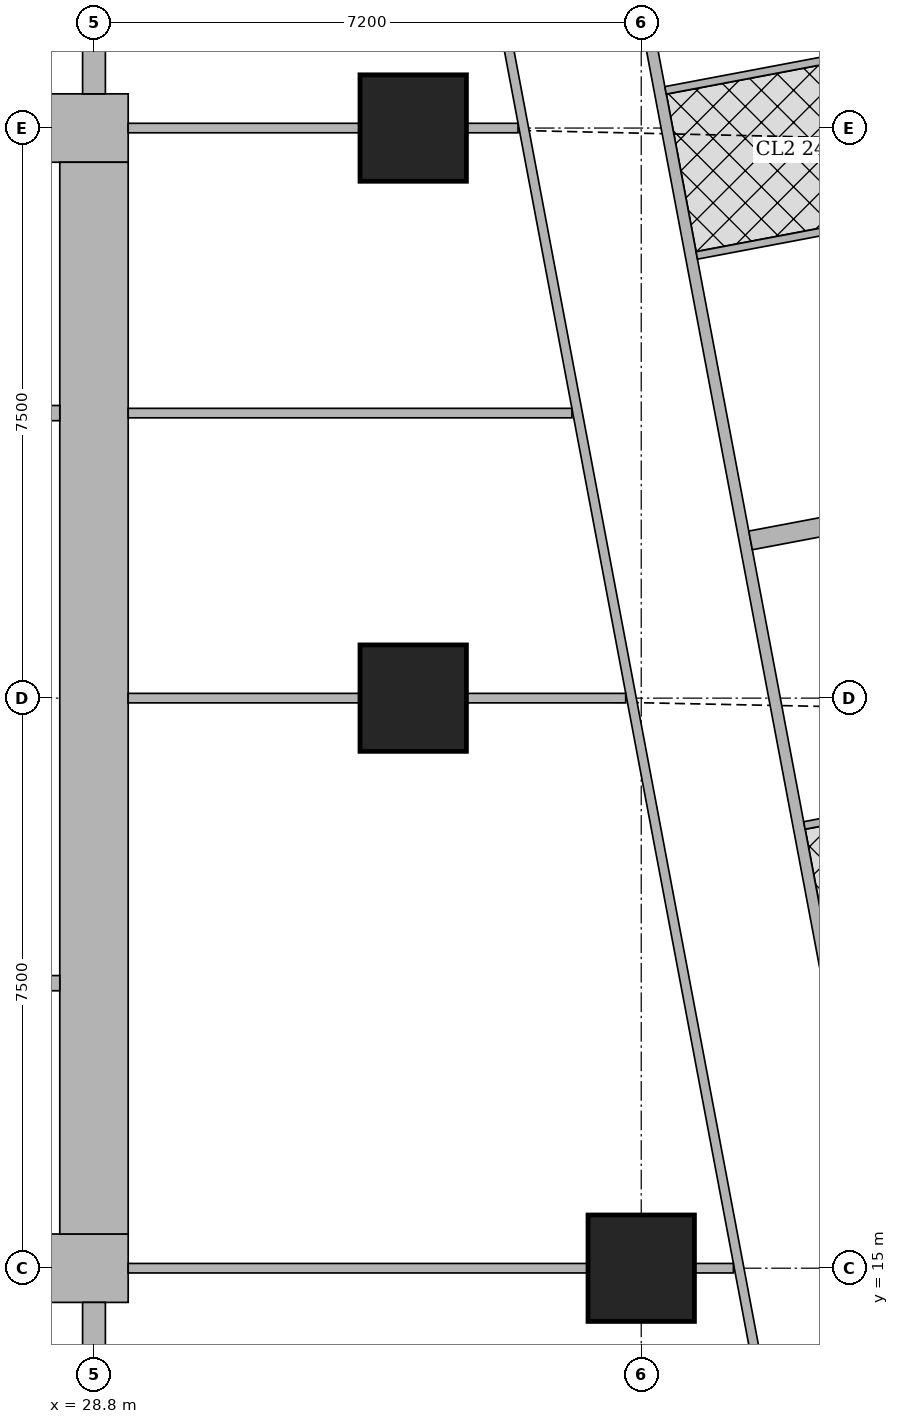
"""IFC4 building model, lengths in metres.
Left out: names, types, materials, properties, quantities, classifications, styles, units other than length and angle.
Written with IfcOpenShell. Run it as: python <this file> out.ifc"""

import sys

from ifc_helpers import new_model, si_unit, direction, frame, frame_2d, origin, origin_2d, place, context, subcontext, project, spatial, rectangle, extrude, element, fill, save


model = new_model("IFC4")
c1 = context("Model", 3, precision=1e-05, world=origin(), true_north=direction((0.0, 1.0)))
c2 = subcontext(c1, "Body", "Model", "MODEL_VIEW")
j1 = project(units=[si_unit("LENGTHUNIT", "METRE"), si_unit("PLANEANGLEUNIT", "RADIAN")], contexts=[c1])
p1 = place(None, origin())
s1 = spatial("IfcSite", under=j1, at=p1, CompositionType="ELEMENT")
p2 = place(p1, origin())
s2 = spatial("IfcBuilding", under=s1, at=p2, CompositionType="ELEMENT")
p3 = place(p2, frame((0.0, 0.0, 262.85)))
s3 = spatial("IfcBuildingStorey", under=s2, at=p3, CompositionType="ELEMENT", Elevation=262.85)
for number, where, z_axis, x_axis in (
    (1, (36.0, 15.0, 0.0), (0.0, 0.0, 1.0), (1.0, 0.0, 0.0)),
    (2, (33.0, 22.5, 0.0), (0.0, 0.0, 1.0), (1.0, 0.0, 0.0)),
    (3, (33.0, 30.0, 0.0), (0.0, 0.0, 1.0), (1.0, 0.0, 0.0)),
):
    element("IfcColumn", number, at=place(p3, frame(where, z_axis=z_axis, x_axis=x_axis)), inside=s3, PredefinedType="COLUMN", context=c2, shape_type="SweptSolid", body=[
        extrude(rectangle(XDim=1.4, YDim=1.4, at=origin_2d()), origin(), (0.0, 0.0, 1.0), 3.75),
    ])
p4 = place(p3, frame((13.95, 15.0, 0.0), z_axis=(0.0, 0.0, 1.0), x_axis=(1.0, 0.0, 0.0)))
e4 = element("IfcWall", 4, at=p4, inside=s3, PredefinedType="SHEAR", context=c2, shape_type="SweptSolid", body=[
    extrude(rectangle(XDim=15.3, YDim=0.9, at=frame_2d((7.65, 0.0))), origin(), (0.0, 0.0, 1.0), 3.75),
])
p5 = place(p4, frame((4.45, 0.0, 0.0)))
e5 = element("IfcOpeningElement", 5, at=p5, cuts=e4, PredefinedType="OPENING", context=c2, shape_type="SweptSolid", body=[
    extrude(rectangle(XDim=1.8, YDim=2.1, at=frame_2d((0.9, 1.05))), frame((0.0, 0.46, 0.0), z_axis=(0.0, -1.0, 0.0), x_axis=(1.0, 0.0, 0.0)), (0.0, 0.0, 1.0), 0.92),
])
p6 = place(p4, frame((10.7, 0.0, 0.0)))
e6 = element("IfcOpeningElement", 6, at=p6, cuts=e4, PredefinedType="OPENING", context=c2, shape_type="SweptSolid", body=[
    extrude(rectangle(XDim=1.1, YDim=2.1, at=frame_2d((0.55, 1.05))), frame((0.0, 0.46, 0.0), z_axis=(0.0, -1.0, 0.0), x_axis=(1.0, 0.0, 0.0)), (0.0, 0.0, 1.0), 0.92),
])
p7 = place(p3, frame((13.95, 30.0, 0.0), z_axis=(0.0, 0.0, 1.0), x_axis=(1.0, 0.0, 0.0)))
e7 = element("IfcWall", 7, at=p7, inside=s3, PredefinedType="SHEAR", context=c2, shape_type="SweptSolid", body=[
    extrude(rectangle(XDim=15.3, YDim=0.9, at=frame_2d((7.65, 0.0))), origin(), (0.0, 0.0, 1.0), 3.75),
])
p8 = place(p7, frame((4.45, 0.0, 0.0)))
e8 = element("IfcOpeningElement", 8, at=p8, cuts=e7, PredefinedType="OPENING", context=c2, shape_type="SweptSolid", body=[
    extrude(rectangle(XDim=1.8, YDim=2.1, at=frame_2d((0.9, 1.05))), frame((0.0, 0.46, 0.0), z_axis=(0.0, -1.0, 0.0), x_axis=(1.0, 0.0, 0.0)), (0.0, 0.0, 1.0), 0.92),
])
p9 = place(p7, frame((10.7, 0.0, 0.0)))
e9 = element("IfcOpeningElement", 9, at=p9, cuts=e7, PredefinedType="OPENING", context=c2, shape_type="SweptSolid", body=[
    extrude(rectangle(XDim=1.1, YDim=2.1, at=frame_2d((0.55, 1.05))), frame((0.0, 0.46, 0.0), z_axis=(0.0, -1.0, 0.0), x_axis=(1.0, 0.0, 0.0)), (0.0, 0.0, 1.0), 0.92),
])
p10 = place(p3, frame((28.8, 15.45, 0.0), z_axis=(0.0, 0.0, 1.0), x_axis=(0.0, 1.0, 0.0)))
e10 = element("IfcWall", 10, at=p10, inside=s3, PredefinedType="SHEAR", context=c2, shape_type="SweptSolid", body=[
    extrude(rectangle(XDim=14.1, YDim=0.9, at=frame_2d((7.05, 0.0))), origin(), (0.0, 0.0, 1.0), 3.75),
])
for number, where, z_axis, x_axis in (
    (11, (28.8, 10.35, 0.0), (0.0, 0.0, 1.0), (0.0, 1.0, 0.0)),
    (12, (28.8, 30.45, 0.0), (0.0, 0.0, 1.0), (0.0, 1.0, 0.0)),
):
    element("IfcWall", number, at=place(p3, frame(where, z_axis=z_axis, x_axis=x_axis)), inside=s3, PredefinedType="SHEAR", context=c2, shape_type="SweptSolid", body=[
        extrude(rectangle(XDim=4.2, YDim=0.3, at=frame_2d((2.1, 0.0))), origin(), (0.0, 0.0, 1.0), 3.75),
    ])
p11 = place(p3, frame((34.036, 42.186, 0.0), z_axis=(0.0, 0.0, 1.0), x_axis=(0.185593518645, -0.9826266055, 0.0)))
e13 = element("IfcWall", 13, at=p11, inside=s3, PredefinedType="SOLIDWALL", context=c2, shape_type="SweptSolid", body=[
    extrude(rectangle(XDim=35.961, YDim=0.15, at=frame_2d((17.98, 0.0))), origin(), (0.0, 0.0, 1.0), 2.5),
])
p12 = place(p11, frame((15.529, 0.0, 0.0)))
e14 = element("IfcOpeningElement", 14, at=p12, cuts=e13, PredefinedType="OPENING", context=c2, shape_type="SweptSolid", body=[
    extrude(rectangle(XDim=1.0, YDim=2.1, at=frame_2d((0.5, 1.05))), frame((0.0, 0.085, 0.0), z_axis=(0.0, -1.0, 0.0), x_axis=(1.0, 0.0, 0.0)), (0.0, 0.0, 1.0), 0.17),
])
p13 = place(p11, frame((19.345, 0.0, 0.0)))
e15 = element("IfcOpeningElement", 15, at=p13, cuts=e13, PredefinedType="OPENING", context=c2, shape_type="SweptSolid", body=[
    extrude(rectangle(XDim=1.0, YDim=2.1, at=frame_2d((0.5, 1.05))), frame((0.0, 0.085, 0.0), z_axis=(0.0, -1.0, 0.0), x_axis=(1.0, 0.0, 0.0)), (0.0, 0.0, 1.0), 0.17),
])
p14 = place(p11, frame((30.594, 0.0, 0.0)))
e16 = element("IfcOpeningElement", 16, at=p14, cuts=e13, PredefinedType="OPENING", context=c2, shape_type="SweptSolid", body=[
    extrude(rectangle(XDim=1.0, YDim=2.1, at=frame_2d((0.5, 1.05))), frame((0.0, 0.085, 0.0), z_axis=(0.0, -1.0, 0.0), x_axis=(1.0, 0.0, 0.0)), (0.0, 0.0, 1.0), 0.17),
])
p15 = place(p3, frame((37.511, 42.109, 0.0), z_axis=(0.0, 0.0, 1.0), x_axis=(0.185550464988, -0.982634736279, 0.0)))
e17 = element("IfcWall", 17, at=p15, inside=s3, PredefinedType="PARTITIONING", context=c2, shape_type="SweptSolid", body=[
    extrude(rectangle(XDim=13.35, YDim=0.1, at=frame_2d((6.675, 0.0))), origin(), (0.0, 0.0, 1.0), 2.5),
])
p16 = place(p15, frame((11.845, 0.0, 0.0)))
e18 = element("IfcOpeningElement", 18, at=p16, cuts=e17, PredefinedType="OPENING", context=c2, shape_type="SweptSolid", body=[
    extrude(rectangle(XDim=0.9, YDim=2.1, at=frame_2d((0.45, 1.05))), frame((0.0, 0.06, 0.0), z_axis=(0.0, -1.0, 0.0), x_axis=(1.0, 0.0, 0.0)), (0.0, 0.0, 1.0), 0.12),
])
p17 = place(p15, frame((8.224, 0.0, 0.0)))
e19 = element("IfcOpeningElement", 19, at=p17, cuts=e17, PredefinedType="OPENING", context=c2, shape_type="SweptSolid", body=[
    extrude(rectangle(XDim=0.9, YDim=2.1, at=frame_2d((0.45, 1.05))), frame((0.0, 0.06, 0.0), z_axis=(0.0, -1.0, 0.0), x_axis=(1.0, 0.0, 0.0)), (0.0, 0.0, 1.0), 0.12),
])
p18 = place(p15, frame((2.65, 0.0, 0.0)))
e20 = element("IfcOpeningElement", 20, at=p18, cuts=e17, PredefinedType="OPENING", context=c2, shape_type="SweptSolid", body=[
    extrude(rectangle(XDim=0.9, YDim=2.1, at=frame_2d((0.45, 1.05))), frame((0.0, 0.06, 0.0), z_axis=(0.0, -1.0, 0.0), x_axis=(1.0, 0.0, 0.0)), (0.0, 0.0, 1.0), 0.12),
])
p19 = place(p15, frame((9.936, 0.0, 0.0)))
e21 = element("IfcOpeningElement", 21, at=p19, cuts=e17, PredefinedType="OPENING", context=c2, shape_type="SweptSolid", body=[
    extrude(rectangle(XDim=0.9, YDim=2.1, at=frame_2d((0.45, 1.05))), frame((0.0, 0.06, 0.0), z_axis=(0.0, -1.0, 0.0), x_axis=(1.0, 0.0, 0.0)), (0.0, 0.0, 1.0), 0.12),
])
p20 = place(p15, frame((5.555, 0.0, 0.0)))
e22 = element("IfcOpeningElement", 22, at=p20, cuts=e17, PredefinedType="OPENING", context=c2, shape_type="SweptSolid", body=[
    extrude(rectangle(XDim=0.9, YDim=2.1, at=frame_2d((0.45, 1.05))), frame((0.0, 0.06, 0.0), z_axis=(0.0, -1.0, 0.0), x_axis=(1.0, 0.0, 0.0)), (0.0, 0.0, 1.0), 0.12),
])
p21 = place(p3, frame((39.997, 28.942, 0.0), z_axis=(0.0, 0.0, 1.0), x_axis=(-0.982569883123, -0.185893584556, 0.0)))
e23 = element("IfcWall", 23, at=p21, inside=s3, PredefinedType="PARTITIONING", context=c2, shape_type="SweptSolid", body=[
    extrude(rectangle(XDim=3.324, YDim=0.1, at=frame_2d((1.662, 0.0))), origin(), (0.0, 0.0, 1.0), 3.5),
])
p22 = place(p3, frame((39.538, 31.104, 0.0), z_axis=(0.0, 0.0, 1.0), x_axis=(-0.982620626894, -0.185625169636, 0.0)))
e24 = element("IfcWall", 24, at=p22, inside=s3, PredefinedType="PARTITIONING", context=c2, shape_type="SweptSolid", body=[
    extrude(rectangle(XDim=3.275, YDim=0.1, at=frame_2d((1.637, 0.0))), origin(), (0.0, 0.0, 1.0), 2.5),
])
p23 = place(p3, frame((41.365, 21.433, 0.0), z_axis=(0.0, 0.0, 1.0), x_axis=(-0.982607026909, -0.185697147715, 0.0)))
e25 = element("IfcWall", 25, at=p23, inside=s3, PredefinedType="PARTITIONING", context=c2, shape_type="SweptSolid", body=[
    extrude(rectangle(XDim=3.275, YDim=0.1, at=frame_2d((1.637, 0.0))), origin(), (0.0, 0.0, 1.0), 3.5),
])
p24 = place(p3, frame((41.885, 25.415, 0.0), z_axis=(0.0, 0.0, 1.0), x_axis=(-0.982612837616, -0.185666398014, 0.0)))
e26 = element("IfcWall", 26, at=p24, inside=s3, PredefinedType="SOLIDWALL", context=c2, shape_type="SweptSolid", body=[
    extrude(rectangle(XDim=4.525, YDim=0.25, at=frame_2d((2.262, 0.0))), origin(), (0.0, 0.0, 1.0), 3.5),
])
p25 = place(p3, frame((38.202, 10.163, 0.0), z_axis=(0.0, 0.0, 1.0), x_axis=(-0.185610321132, 0.982623431783, 0.0)))
e27 = element("IfcWall", 27, at=p25, inside=s3, PredefinedType="PARTITIONING", context=c2, shape_type="SweptSolid", body=[
    extrude(rectangle(XDim=25.111, YDim=0.125, at=frame_2d((12.556, 0.0))), origin(), (0.0, 0.0, 1.0), 2.5),
])
p26 = place(p25, frame((0.708, 0.0, 0.0)))
e28 = element("IfcOpeningElement", 28, at=p26, cuts=e27, PredefinedType="OPENING", context=c2, shape_type="SweptSolid", body=[
    extrude(rectangle(XDim=1.0, YDim=2.1, at=frame_2d((0.5, 1.05))), frame((0.0, 0.073, 0.0), z_axis=(0.0, -1.0, 0.0), x_axis=(1.0, 0.0, 0.0)), (0.0, 0.0, 1.0), 0.145),
])
p27 = place(p25, frame((5.9, 0.0, 0.0)))
e29 = element("IfcOpeningElement", 29, at=p27, cuts=e27, PredefinedType="OPENING", context=c2, shape_type="SweptSolid", body=[
    extrude(rectangle(XDim=1.0, YDim=2.1, at=frame_2d((0.5, 1.05))), frame((0.0, 0.073, 0.0), z_axis=(0.0, -1.0, 0.0), x_axis=(1.0, 0.0, 0.0)), (0.0, 0.0, 1.0), 0.145),
])
p28 = place(p25, frame((13.378, 0.0, 0.0)))
e30 = element("IfcOpeningElement", 30, at=p28, cuts=e27, PredefinedType="OPENING", context=c2, shape_type="SweptSolid", body=[
    extrude(rectangle(XDim=1.0, YDim=2.1, at=frame_2d((0.5, 1.05))), frame((0.0, 0.073, 0.0), z_axis=(0.0, -1.0, 0.0), x_axis=(1.0, 0.0, 0.0)), (0.0, 0.0, 1.0), 0.145),
])
p29 = place(p25, frame((17.194, 0.0, 0.0)))
e31 = element("IfcOpeningElement", 31, at=p29, cuts=e27, PredefinedType="OPENING", context=c2, shape_type="SweptSolid", body=[
    extrude(rectangle(XDim=1.0, YDim=2.1, at=frame_2d((0.5, 1.05))), frame((0.0, 0.073, 0.0), z_axis=(0.0, -1.0, 0.0), x_axis=(1.0, 0.0, 0.0)), (0.0, 0.0, 1.0), 0.145),
])
p30 = place(p25, frame((21.15, 0.0, 0.0)))
e32 = element("IfcOpeningElement", 32, at=p30, cuts=e27, PredefinedType="OPENING", context=c2, shape_type="SweptSolid", body=[
    extrude(rectangle(XDim=1.0, YDim=2.1, at=frame_2d((0.5, 1.05))), frame((0.0, 0.073, 0.0), z_axis=(0.0, -1.0, 0.0), x_axis=(1.0, 0.0, 0.0)), (0.0, 0.0, 1.0), 0.145),
])
p31 = place(p3, frame((29.25, 15.0, 0.0), z_axis=(0.0, 0.0, 1.0), x_axis=(1.0, 0.0, 0.0)))
e33 = element("IfcWall", 33, at=p31, inside=s3, PredefinedType="PARTITIONING", context=c2, shape_type="SweptSolid", body=[
    extrude(rectangle(XDim=6.049, YDim=0.125, at=frame_2d((3.024, 0.0))), origin(), (0.0, 0.0, 1.0), 3.5),
])
p32 = place(p3, frame((36.701, 15.0, 0.0), z_axis=(0.0, 0.0, 1.0), x_axis=(1.0, 0.0, 0.0)))
e34 = element("IfcWall", 34, at=p32, inside=s3, PredefinedType="PARTITIONING", context=c2, shape_type="SweptSolid", body=[
    extrude(rectangle(XDim=0.512, YDim=0.125, at=frame_2d((0.256, 0.0))), origin(), (0.0, 0.0, 1.0), 3.5),
])
p33 = place(p3, frame((29.25, 22.5, 0.0), z_axis=(0.0, 0.0, 1.0), x_axis=(1.0, 0.0, 0.0)))
e35 = element("IfcWall", 35, at=p33, inside=s3, PredefinedType="PARTITIONING", context=c2, shape_type="SweptSolid", body=[
    extrude(rectangle(XDim=3.049, YDim=0.125, at=frame_2d((1.524, 0.0))), origin(), (0.0, 0.0, 1.0), 3.5),
])
p34 = place(p3, frame((33.701, 22.5, 0.0), z_axis=(0.0, 0.0, 1.0), x_axis=(1.0, 0.0, 0.0)))
e36 = element("IfcWall", 36, at=p34, inside=s3, PredefinedType="PARTITIONING", context=c2, shape_type="SweptSolid", body=[
    extrude(rectangle(XDim=2.095, YDim=0.125, at=frame_2d((1.047, 0.0))), origin(), (0.0, 0.0, 1.0), 2.5),
])
p35 = place(p3, frame((29.25, 26.25, 0.0), z_axis=(0.0, 0.0, 1.0), x_axis=(1.0, 0.0, 0.0)))
e37 = element("IfcWall", 37, at=p35, inside=s3, PredefinedType="PARTITIONING", context=c2, shape_type="SweptSolid", body=[
    extrude(rectangle(XDim=5.838, YDim=0.125, at=frame_2d((2.919, 0.0))), origin(), (0.0, 0.0, 1.0), 3.5),
])
p36 = place(p3, frame((29.25, 30.0, 0.0), z_axis=(0.0, 0.0, 1.0), x_axis=(1.0, 0.0, 0.0)))
e38 = element("IfcWall", 38, at=p36, inside=s3, PredefinedType="PARTITIONING", context=c2, shape_type="SweptSolid", body=[
    extrude(rectangle(XDim=3.049, YDim=0.125, at=frame_2d((1.524, 0.0))), origin(), (0.0, 0.0, 1.0), 3.5),
])
p37 = place(p3, frame((33.701, 30.0, 0.0), z_axis=(0.0, 0.0, 1.0), x_axis=(1.0, 0.0, 0.0)))
e39 = element("IfcWall", 39, at=p37, inside=s3, PredefinedType="PARTITIONING", context=c2, shape_type="SweptSolid", body=[
    extrude(rectangle(XDim=0.678, YDim=0.125, at=frame_2d((0.339, 0.0))), origin(), (0.0, 0.0, 1.0), 2.5),
])
for number, where, z_axis, x_axis in (
    (40, (27.4, 18.75, 0.0), (0.0, 0.0, 1.0), (1.0, 0.0, 0.0)),
    (41, (27.4, 26.25, 0.0), (0.0, 0.0, 1.0), (1.0, 0.0, 0.0)),
):
    element("IfcWall", number, at=place(p3, frame(where, z_axis=z_axis, x_axis=x_axis)), inside=s3, PredefinedType="SOLIDWALL", context=c2, shape_type="SweptSolid", body=[
        extrude(rectangle(XDim=0.95, YDim=0.2, at=frame_2d((0.475, 0.0))), origin(), (0.0, 0.0, 1.0), 3.5),
    ])
p38 = place(p12, origin())
e42 = element("IfcDoor", 42, at=p38, inside=s3, OperationType="SINGLE_SWING_LEFT", PredefinedType="DOOR", context=c2, shape_type="SweptSolid", body=[
    extrude(rectangle(XDim=1.0, YDim=2.1, at=frame_2d((0.5, 1.05))), frame((0.0, 0.025, 0.0), z_axis=(0.0, -1.0, 0.0), x_axis=(1.0, 0.0, 0.0)), (0.0, 0.0, 1.0), 0.05),
])
fill(e14, e42)
p39 = place(p13, origin())
e43 = element("IfcDoor", 43, at=p39, inside=s3, OperationType="SINGLE_SWING_RIGHT", PredefinedType="DOOR", context=c2, shape_type="SweptSolid", body=[
    extrude(rectangle(XDim=1.0, YDim=2.1, at=frame_2d((0.5, 1.05))), frame((0.0, 0.025, 0.0), z_axis=(0.0, -1.0, 0.0), x_axis=(1.0, 0.0, 0.0)), (0.0, 0.0, 1.0), 0.05),
])
fill(e15, e43)
p40 = place(p27, origin())
e44 = element("IfcDoor", 44, at=p40, inside=s3, OperationType="SINGLE_SWING_LEFT", PredefinedType="DOOR", context=c2, shape_type="SweptSolid", body=[
    extrude(rectangle(XDim=1.0, YDim=2.1, at=frame_2d((0.5, 1.05))), frame((0.0, 0.025, 0.0), z_axis=(0.0, -1.0, 0.0), x_axis=(1.0, 0.0, 0.0)), (0.0, 0.0, 1.0), 0.05),
])
fill(e29, e44)
p41 = place(p28, origin())
e45 = element("IfcDoor", 45, at=p41, inside=s3, OperationType="SINGLE_SWING_LEFT", PredefinedType="DOOR", context=c2, shape_type="SweptSolid", body=[
    extrude(rectangle(XDim=1.0, YDim=2.1, at=frame_2d((0.5, 1.05))), frame((0.0, 0.025, 0.0), z_axis=(0.0, -1.0, 0.0), x_axis=(1.0, 0.0, 0.0)), (0.0, 0.0, 1.0), 0.05),
])
fill(e30, e45)
p42 = place(p29, origin())
e46 = element("IfcDoor", 46, at=p42, inside=s3, OperationType="SINGLE_SWING_LEFT", PredefinedType="DOOR", context=c2, shape_type="SweptSolid", body=[
    extrude(rectangle(XDim=1.0, YDim=2.1, at=frame_2d((0.5, 1.05))), frame((0.0, 0.025, 0.0), z_axis=(0.0, -1.0, 0.0), x_axis=(1.0, 0.0, 0.0)), (0.0, 0.0, 1.0), 0.05),
])
fill(e31, e46)
p43 = place(p30, origin())
e47 = element("IfcDoor", 47, at=p43, inside=s3, OperationType="SINGLE_SWING_LEFT", PredefinedType="DOOR", context=c2, shape_type="SweptSolid", body=[
    extrude(rectangle(XDim=1.0, YDim=2.1, at=frame_2d((0.5, 1.05))), frame((0.0, 0.025, 0.0), z_axis=(0.0, -1.0, 0.0), x_axis=(1.0, 0.0, 0.0)), (0.0, 0.0, 1.0), 0.05),
])
fill(e32, e47)
save(model, sys.argv[1])
